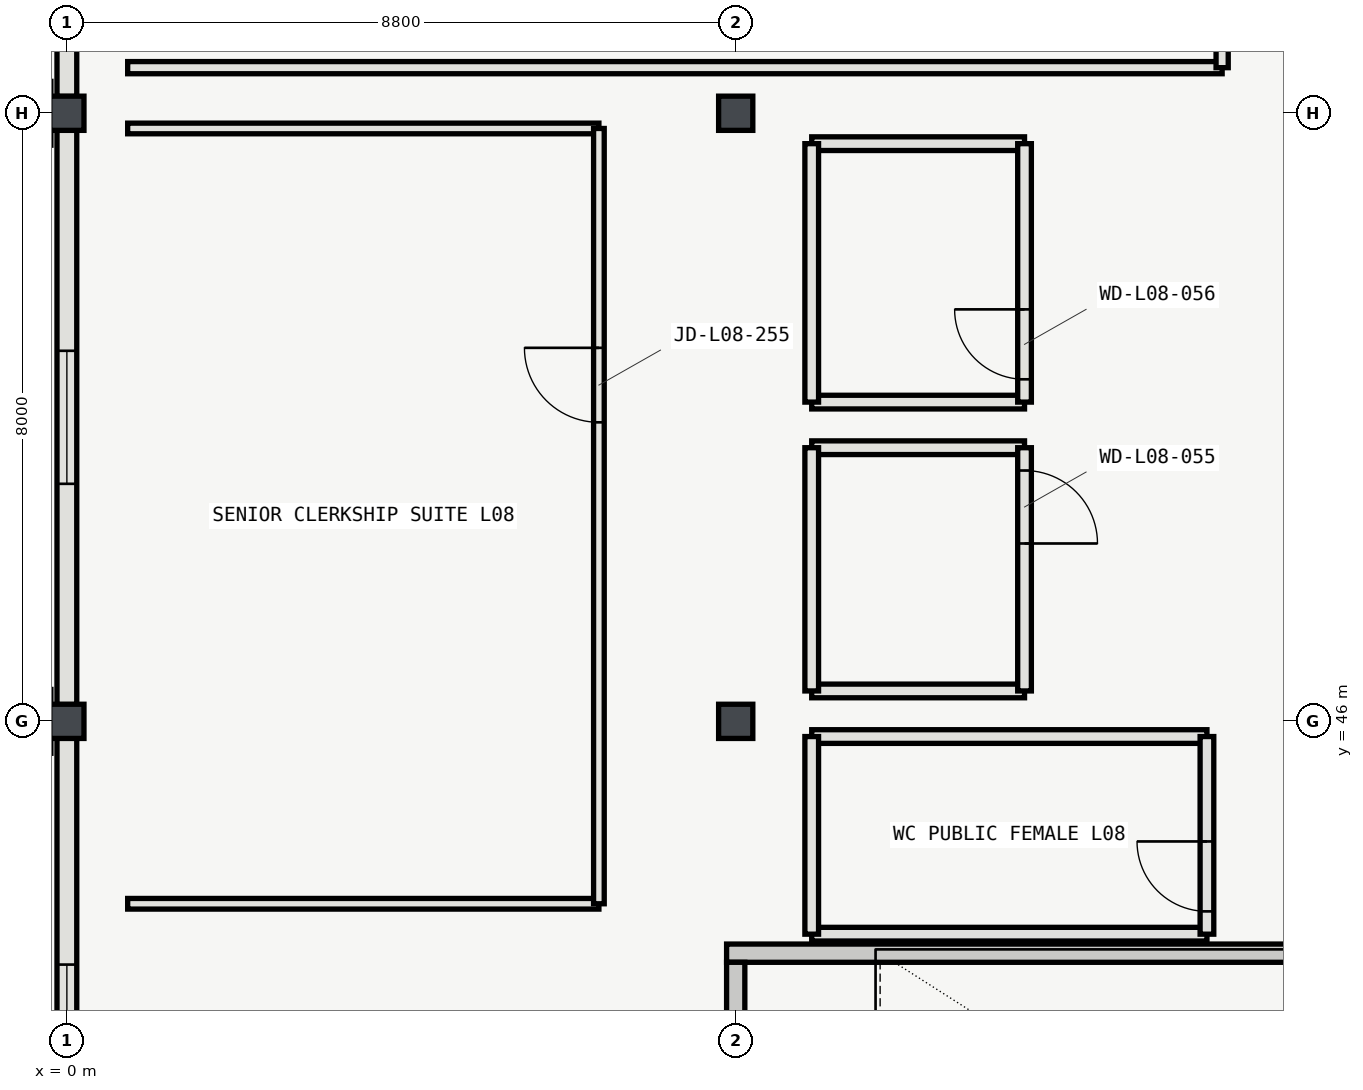
"""IFC4 building model, lengths in metres.
Left out: names, types, materials, properties, quantities, classifications, styles, units other than length and angle.
Written with IfcOpenShell. Run it as: python <this file> out.ifc"""

import sys

from ifc_helpers import new_model, si_unit, direction, frame, frame_2d, origin, origin_2d, place, context, subcontext, project, spatial, rectangle, hollow_rectangle, extrude, element, fill, save


model = new_model("IFC4")
c1 = context("Model", 3, precision=1e-05, world=origin(), true_north=direction((0.0, 1.0)))
c2 = subcontext(c1, "Body", "Model", "MODEL_VIEW")
j1 = project(units=[si_unit("LENGTHUNIT", "METRE"), si_unit("PLANEANGLEUNIT", "RADIAN")], contexts=[c1])
p1 = place(None, origin())
s1 = spatial("IfcSite", under=j1, at=p1, CompositionType="ELEMENT")
p2 = place(p1, origin())
s2 = spatial("IfcBuilding", under=s1, at=p2, CompositionType="ELEMENT")
p3 = place(p2, frame((0.0, 0.0, 37.2)))
s3 = spatial("IfcBuildingStorey", under=s2, at=p3, CompositionType="ELEMENT", Elevation=37.2)
for number, where, z_axis, x_axis in (
    (1, (0.0, 46.0, 0.0), (0.0, 0.0, 1.0), (1.0, 0.0, 0.0)),
    (2, (0.0, 54.0, 0.0), (0.0, 0.0, 1.0), (1.0, 0.0, 0.0)),
    (3, (8.8, 46.0, 0.0), (0.0, 0.0, 1.0), (1.0, 0.0, 0.0)),
    (4, (8.8, 54.0, 0.0), (0.0, 0.0, 1.0), (1.0, 0.0, 0.0)),
):
    element("IfcColumn", number, at=place(p3, frame(where, z_axis=z_axis, x_axis=x_axis)), inside=s3, PredefinedType="COLUMN", context=c2, shape_type="SweptSolid", body=[
        extrude(hollow_rectangle(XDim=0.45, YDim=0.45, WallThickness=0.018, InnerFilletRadius=0.018, OuterFilletRadius=0.036, at=origin_2d()), origin(), (0.0, 0.0, 1.0), 4.2),
    ])
p4 = place(p3, frame((0.0, 45.779, 0.0), z_axis=(0.0, 0.0, 1.0), x_axis=(0.0, -1.0, 0.0)))
e5 = element("IfcWall", 5, at=p4, inside=s3, PredefinedType="SOLIDWALL", context=c2, shape_type="SweptSolid", body=[
    extrude(rectangle(XDim=7.558, YDim=0.26, at=frame_2d((3.779, 0.0))), origin(), (0.0, 0.0, 1.0), 3.483),
])
p5 = place(p4, frame((2.979, 0.0, 0.95)))
e6 = element("IfcOpeningElement", 6, at=p5, cuts=e5, PredefinedType="OPENING", context=c2, shape_type="SweptSolid", body=[
    extrude(rectangle(XDim=1.6, YDim=1.6, at=frame_2d((0.8, 0.8))), frame((0.0, 0.14, 0.0), z_axis=(0.0, -1.0, 0.0), x_axis=(1.0, 0.0, 0.0)), (0.0, 0.0, 1.0), 0.28),
])
p6 = place(p3, frame((0.0, 53.779, 0.0), z_axis=(0.0, 0.0, 1.0), x_axis=(0.0, -1.0, 0.0)))
e7 = element("IfcWall", 7, at=p6, inside=s3, PredefinedType="SOLIDWALL", context=c2, shape_type="SweptSolid", body=[
    extrude(rectangle(XDim=7.558, YDim=0.26, at=frame_2d((3.779, 0.0))), origin(), (0.0, 0.0, 1.0), 3.483),
])
p7 = place(p6, frame((2.904, 0.0, 0.95)))
e8 = element("IfcOpeningElement", 8, at=p7, cuts=e7, PredefinedType="OPENING", context=c2, shape_type="SweptSolid", body=[
    extrude(rectangle(XDim=1.75, YDim=1.6, at=frame_2d((0.875, 0.8))), frame((0.0, 0.14, 0.0), z_axis=(0.0, -1.0, 0.0), x_axis=(1.0, 0.0, 0.0)), (0.0, 0.0, 1.0), 0.28),
])
p8 = place(p3, frame((0.0, 61.779, 0.0), z_axis=(0.0, 0.0, 1.0), x_axis=(0.0, -1.0, 0.0)))
e9 = element("IfcWall", 9, at=p8, inside=s3, PredefinedType="SOLIDWALL", context=c2, shape_type="SweptSolid", body=[
    extrude(rectangle(XDim=7.558, YDim=0.26, at=frame_2d((3.779, 0.0))), origin(), (0.0, 0.0, 1.0), 3.483),
])
p9 = place(p8, frame((2.829, 0.0, 0.95)))
e10 = element("IfcOpeningElement", 10, at=p9, cuts=e9, PredefinedType="OPENING", context=c2, shape_type="SweptSolid", body=[
    extrude(rectangle(XDim=1.9, YDim=1.6, at=frame_2d((0.95, 0.8))), frame((0.0, 0.14, 0.0), z_axis=(0.0, -1.0, 0.0), x_axis=(1.0, 0.0, 0.0)), (0.0, 0.0, 1.0), 0.28),
])
for number, where, z_axis, x_axis in (
    (11, (9.8, 46.4, 0.0), (0.0, 0.0, 1.0), (1.0, 0.0, 0.0)),
    (12, (12.6, 49.6, 0.0), (0.0, 0.0, 1.0), (-1.0, 0.0, 0.0)),
):
    element("IfcWall", number, at=place(p3, frame(where, z_axis=z_axis, x_axis=x_axis)), inside=s3, PredefinedType="PLUMBINGWALL", context=c2, shape_type="SweptSolid", body=[
        extrude(rectangle(XDim=2.8, YDim=0.18, at=frame_2d((1.4, 0.0))), origin(), (0.0, 0.0, 1.0), 3.92),
    ])
p10 = place(p3, frame((9.8, 49.6, 0.0), z_axis=(0.0, 0.0, 1.0), x_axis=(0.0, -1.0, 0.0)))
e13 = element("IfcWall", 13, at=p10, inside=s3, PredefinedType="PLUMBINGWALL", context=c2, shape_type="SweptSolid", body=[
    extrude(rectangle(XDim=3.2, YDim=0.18, at=frame_2d((1.6, 0.0))), origin(), (0.0, 0.0, 1.0), 3.92),
])
p11 = place(p3, frame((12.6, 46.4, 0.0), z_axis=(0.0, 0.0, 1.0), x_axis=(0.0, 1.0, 0.0)))
e14 = element("IfcWall", 14, at=p11, inside=s3, PredefinedType="PLUMBINGWALL", context=c2, shape_type="SweptSolid", body=[
    extrude(rectangle(XDim=3.2, YDim=0.18, at=frame_2d((1.6, 0.0))), origin(), (0.0, 0.0, 1.0), 3.92),
])
p12 = place(p11, frame((1.94, 0.0, 0.0)))
e15 = element("IfcOpeningElement", 15, at=p12, cuts=e14, PredefinedType="OPENING", context=c2, shape_type="SweptSolid", body=[
    extrude(rectangle(XDim=0.96, YDim=2.1, at=frame_2d((0.48, 1.05))), frame((0.0, 0.1, 0.0), z_axis=(0.0, -1.0, 0.0), x_axis=(1.0, 0.0, 0.0)), (0.0, 0.0, 1.0), 0.2),
])
for number, where, z_axis, x_axis in (
    (16, (9.8, 50.2, 0.0), (0.0, 0.0, 1.0), (1.0, 0.0, 0.0)),
    (17, (12.6, 53.6, 0.0), (0.0, 0.0, 1.0), (-1.0, 0.0, 0.0)),
):
    element("IfcWall", number, at=place(p3, frame(where, z_axis=z_axis, x_axis=x_axis)), inside=s3, PredefinedType="PLUMBINGWALL", context=c2, shape_type="SweptSolid", body=[
        extrude(rectangle(XDim=2.8, YDim=0.18, at=frame_2d((1.4, 0.0))), origin(), (0.0, 0.0, 1.0), 3.92),
    ])
p13 = place(p3, frame((9.8, 53.6, 0.0), z_axis=(0.0, 0.0, 1.0), x_axis=(0.0, -1.0, 0.0)))
e18 = element("IfcWall", 18, at=p13, inside=s3, PredefinedType="PLUMBINGWALL", context=c2, shape_type="SweptSolid", body=[
    extrude(rectangle(XDim=3.4, YDim=0.18, at=frame_2d((1.7, 0.0))), origin(), (0.0, 0.0, 1.0), 3.92),
])
p14 = place(p3, frame((12.6, 50.2, 0.0), z_axis=(0.0, 0.0, 1.0), x_axis=(0.0, 1.0, 0.0)))
e19 = element("IfcWall", 19, at=p14, inside=s3, PredefinedType="PLUMBINGWALL", context=c2, shape_type="SweptSolid", body=[
    extrude(rectangle(XDim=3.4, YDim=0.18, at=frame_2d((1.7, 0.0))), origin(), (0.0, 0.0, 1.0), 3.92),
])
p15 = place(p14, frame((0.3, 0.0, 0.0)))
e20 = element("IfcOpeningElement", 20, at=p15, cuts=e19, PredefinedType="OPENING", context=c2, shape_type="SweptSolid", body=[
    extrude(rectangle(XDim=0.92, YDim=2.1, at=frame_2d((0.46, 1.05))), frame((0.0, 0.1, 0.0), z_axis=(0.0, -1.0, 0.0), x_axis=(1.0, 0.0, 0.0)), (0.0, 0.0, 1.0), 0.2),
])
p16 = place(p3, frame((9.8, 43.2, 0.0), z_axis=(0.0, 0.0, 1.0), x_axis=(1.0, 0.0, 0.0)))
e21 = element("IfcWall", 21, at=p16, inside=s3, PredefinedType="PLUMBINGWALL", context=c2, shape_type="SweptSolid", body=[
    extrude(rectangle(XDim=5.2, YDim=0.18, at=frame_2d((2.6, 0.0))), origin(), (0.0, 0.0, 1.0), 3.92),
])
p17 = place(p3, frame((15.0, 45.8, 0.0), z_axis=(0.0, 0.0, 1.0), x_axis=(-1.0, 0.0, 0.0)))
e22 = element("IfcWall", 22, at=p17, inside=s3, PredefinedType="PLUMBINGWALL", context=c2, shape_type="SweptSolid", body=[
    extrude(rectangle(XDim=5.2, YDim=0.18, at=frame_2d((2.6, 0.0))), origin(), (0.0, 0.0, 1.0), 3.596),
])
p18 = place(p3, frame((9.8, 45.8, 0.0), z_axis=(0.0, 0.0, 1.0), x_axis=(0.0, -1.0, 0.0)))
e23 = element("IfcWall", 23, at=p18, inside=s3, PredefinedType="PLUMBINGWALL", context=c2, shape_type="SweptSolid", body=[
    extrude(rectangle(XDim=2.6, YDim=0.18, at=frame_2d((1.3, 0.0))), origin(), (0.0, 0.0, 1.0), 3.92),
])
p19 = place(p3, frame((15.0, 43.2, 0.0), z_axis=(0.0, 0.0, 1.0), x_axis=(0.0, 1.0, 0.0)))
e24 = element("IfcWall", 24, at=p19, inside=s3, PredefinedType="PLUMBINGWALL", context=c2, shape_type="SweptSolid", body=[
    extrude(rectangle(XDim=2.6, YDim=0.18, at=frame_2d((1.3, 0.0))), origin(), (0.0, 0.0, 1.0), 3.92),
])
p20 = place(p19, frame((0.3, 0.0, 0.0)))
e25 = element("IfcOpeningElement", 25, at=p20, cuts=e24, PredefinedType="OPENING", context=c2, shape_type="SweptSolid", body=[
    extrude(rectangle(XDim=0.92, YDim=2.1, at=frame_2d((0.46, 1.05))), frame((0.0, 0.1, 0.0), z_axis=(0.0, -1.0, 0.0), x_axis=(1.0, 0.0, 0.0)), (0.0, 0.0, 1.0), 0.2),
])
p21 = place(p3, frame((0.8, 54.6, 0.0), z_axis=(0.0, 0.0, 1.0), x_axis=(1.0, 0.0, 0.0)))
e26 = element("IfcWall", 26, at=p21, inside=s3, PredefinedType="PARTITIONING", context=c2, shape_type="SweptSolid", body=[
    extrude(rectangle(XDim=14.4, YDim=0.16, at=frame_2d((7.2, 0.0))), origin(), (0.0, 0.0, 1.0), 3.92),
])
p22 = place(p3, frame((15.2, 54.6, 0.0), z_axis=(0.0, 0.0, 1.0), x_axis=(0.0, 1.0, 0.0)))
e27 = element("IfcWall", 27, at=p22, inside=s3, PredefinedType="PARTITIONING", context=c2, shape_type="SweptSolid", body=[
    extrude(rectangle(XDim=14.8, YDim=0.16, at=frame_2d((7.4, 0.0))), origin(), (0.0, 0.0, 1.0), 3.92),
])
p23 = place(p22, frame((2.8, 0.0, 0.0)))
e28 = element("IfcOpeningElement", 28, at=p23, cuts=e27, PredefinedType="OPENING", context=c2, shape_type="SweptSolid", body=[
    extrude(rectangle(XDim=1.7, YDim=2.3, at=frame_2d((0.85, 1.15))), frame((0.0, 0.09, 0.0), z_axis=(0.0, -1.0, 0.0), x_axis=(1.0, 0.0, 0.0)), (0.0, 0.0, 1.0), 0.18),
])
p24 = place(p3, frame((0.8, 43.6, 0.0), z_axis=(0.0, 0.0, 1.0), x_axis=(1.0, 0.0, 0.0)))
e29 = element("IfcWall", 29, at=p24, inside=s3, PredefinedType="PARTITIONING", context=c2, shape_type="SweptSolid", body=[
    extrude(rectangle(XDim=6.2, YDim=0.14, at=frame_2d((3.1, 0.0))), origin(), (0.0, 0.0, 1.0), 3.92),
])
p25 = place(p3, frame((7.0, 53.8, 0.0), z_axis=(0.0, 0.0, 1.0), x_axis=(-1.0, 0.0, 0.0)))
e30 = element("IfcWall", 30, at=p25, inside=s3, PredefinedType="PARTITIONING", context=c2, shape_type="SweptSolid", body=[
    extrude(rectangle(XDim=6.2, YDim=0.14, at=frame_2d((3.1, 0.0))), origin(), (0.0, 0.0, 1.0), 3.486),
])
p26 = place(p3, frame((7.0, 43.6, 0.0), z_axis=(0.0, 0.0, 1.0), x_axis=(0.0, 1.0, 0.0)))
e31 = element("IfcWall", 31, at=p26, inside=s3, PredefinedType="PARTITIONING", context=c2, shape_type="SweptSolid", body=[
    extrude(rectangle(XDim=10.2, YDim=0.14, at=frame_2d((5.1, 0.0))), origin(), (0.0, 0.0, 1.0), 3.92),
])
p27 = place(p26, frame((6.334, 0.0, 0.0)))
e32 = element("IfcOpeningElement", 32, at=p27, cuts=e31, PredefinedType="OPENING", context=c2, shape_type="SweptSolid", body=[
    extrude(rectangle(XDim=0.98, YDim=2.15, at=frame_2d((0.49, 1.075))), frame((0.0, 0.08, 0.0), z_axis=(0.0, -1.0, 0.0), x_axis=(1.0, 0.0, 0.0)), (0.0, 0.0, 1.0), 0.16),
])
p28 = place(p3, frame((17.72, 42.95, 0.0), z_axis=(0.0, 0.0, 1.0), x_axis=(-1.0, 0.0, 0.0)))
e33 = element("IfcWall", 33, at=p28, inside=s3, PredefinedType="SHEAR", context=c2, shape_type="SweptSolid", body=[
    extrude(rectangle(XDim=9.04, YDim=0.24, at=frame_2d((4.52, 0.0))), origin(), (0.0, 0.0, 1.0), 3.95),
])
p29 = place(p3, frame((8.8, 38.67, 0.0), z_axis=(0.0, 0.0, 1.0), x_axis=(0.0, 1.0, 0.0)))
e34 = element("IfcWall", 34, at=p29, inside=s3, PredefinedType="SHEAR", context=c2, shape_type="SweptSolid", body=[
    extrude(rectangle(XDim=4.16, YDim=0.24, at=frame_2d((2.08, 0.0))), origin(), (0.0, 0.0, 1.0), 3.95),
])
p30 = place(p29, frame((1.38, 0.0, 0.0)))
e35 = element("IfcOpeningElement", 35, at=p30, cuts=e34, PredefinedType="OPENING", context=c2, shape_type="SweptSolid", body=[
    extrude(rectangle(XDim=1.4, YDim=2.2, at=frame_2d((0.7, 1.1))), frame((0.0, 0.13, 0.0), z_axis=(0.0, -1.0, 0.0), x_axis=(1.0, 0.0, 0.0)), (0.0, 0.0, 1.0), 0.26),
])
p31 = place(p5, origin())
e36 = element("IfcWindow", 36, at=p31, inside=s3, PartitioningType="SINGLE_PANEL", PredefinedType="WINDOW", context=c2, shape_type="SweptSolid", body=[
    extrude(rectangle(XDim=1.6, YDim=1.6, at=frame_2d((0.8, 0.8))), frame((0.0, 0.03, 0.0), z_axis=(0.0, -1.0, 0.0), x_axis=(1.0, 0.0, 0.0)), (0.0, 0.0, 1.0), 0.06),
])
fill(e6, e36)
p32 = place(p7, origin())
e37 = element("IfcWindow", 37, at=p32, inside=s3, PartitioningType="SINGLE_PANEL", PredefinedType="WINDOW", context=c2, shape_type="SweptSolid", body=[
    extrude(rectangle(XDim=1.75, YDim=1.6, at=frame_2d((0.875, 0.8))), frame((0.0, 0.03, 0.0), z_axis=(0.0, -1.0, 0.0), x_axis=(1.0, 0.0, 0.0)), (0.0, 0.0, 1.0), 0.06),
])
fill(e8, e37)
p33 = place(p12, origin())
e38 = element("IfcDoor", 38, at=p33, inside=s3, OperationType="SINGLE_SWING_LEFT", PredefinedType="DOOR", context=c2, shape_type="SweptSolid", body=[
    extrude(rectangle(XDim=0.96, YDim=2.1, at=frame_2d((0.48, 1.05))), frame((0.0, 0.025, 0.0), z_axis=(0.0, -1.0, 0.0), x_axis=(1.0, 0.0, 0.0)), (0.0, 0.0, 1.0), 0.05),
])
fill(e15, e38)
p34 = place(p15, origin())
e39 = element("IfcDoor", 39, at=p34, inside=s3, OperationType="SINGLE_SWING_RIGHT", PredefinedType="DOOR", context=c2, shape_type="SweptSolid", body=[
    extrude(rectangle(XDim=0.92, YDim=2.1, at=frame_2d((0.46, 1.05))), frame((0.0, 0.025, 0.0), z_axis=(0.0, -1.0, 0.0), x_axis=(1.0, 0.0, 0.0)), (0.0, 0.0, 1.0), 0.05),
])
fill(e20, e39)
p35 = place(p20, origin())
e40 = element("IfcDoor", 40, at=p35, inside=s3, OperationType="SINGLE_SWING_RIGHT", PredefinedType="DOOR", context=c2, shape_type="SweptSolid", body=[
    extrude(rectangle(XDim=0.92, YDim=2.1, at=frame_2d((0.46, 1.05))), frame((0.0, 0.025, 0.0), z_axis=(0.0, -1.0, 0.0), x_axis=(1.0, 0.0, 0.0)), (0.0, 0.0, 1.0), 0.05),
])
fill(e25, e40)
p36 = place(p27, origin())
e41 = element("IfcDoor", 41, at=p36, inside=s3, OperationType="SINGLE_SWING_RIGHT", PredefinedType="DOOR", context=c2, shape_type="SweptSolid", body=[
    extrude(rectangle(XDim=0.98, YDim=2.15, at=frame_2d((0.49, 1.075))), frame((0.0, 0.025, 0.0), z_axis=(0.0, -1.0, 0.0), x_axis=(1.0, 0.0, 0.0)), (0.0, 0.0, 1.0), 0.05),
])
fill(e32, e41)
save(model, sys.argv[1])
